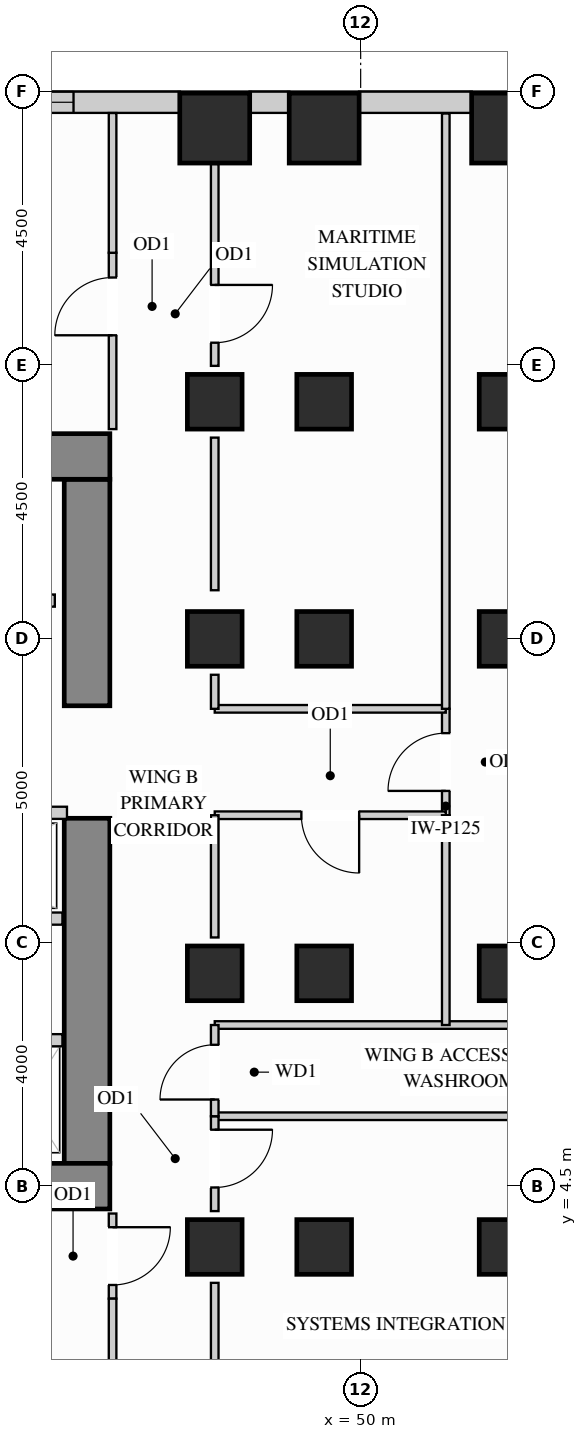
"""IFC4 building model, lengths in metres.
Left out: names, types, materials, properties, quantities, classifications, styles, units other than length and angle.
Written with IfcOpenShell. Run it as: python <this file> out.ifc"""

import sys

from ifc_helpers import new_model, si_unit, direction, frame, frame_2d, origin, origin_2d, place, context, subcontext, project, spatial, rectangle, extrude, source, transform, mapped, element, fill, save


model = new_model("IFC4")
c1 = context("Model", 3, precision=1e-05, world=origin(), true_north=direction((0.0, 1.0)))
c2 = subcontext(c1, "Body", "Model", "MODEL_VIEW")
j1 = project(units=[si_unit("LENGTHUNIT", "METRE"), si_unit("PLANEANGLEUNIT", "RADIAN")], contexts=[c1])
p1 = place(None, origin())
s1 = spatial("IfcSite", under=j1, at=p1, CompositionType="ELEMENT")
p2 = place(p1, origin())
s2 = spatial("IfcBuilding", under=s1, at=p2, CompositionType="ELEMENT")
p3 = place(p2, frame((0.0, 0.0, 77.4)))
s3 = spatial("IfcBuildingStorey", under=s2, at=p3, CompositionType="ELEMENT", Elevation=77.4)
m1 = source(origin(), c2, "Body", "SweptSolid", [
    extrude(rectangle(XDim=0.9, YDim=0.9, at=origin_2d()), origin(), (0.0, 0.0, 1.0), 3.38),
])
for number, where, z_axis, x_axis in (
    (1, (47.6, 13.5, 0.0), (0.0, 0.0, 1.0), (1.0, 0.0, 0.0)),
    (2, (47.6, 3.5, 0.0), (0.0, 0.0, 1.0), (1.0, 0.0, 0.0)),
    (3, (47.6, 8.0, 0.0), (0.0, 0.0, 1.0), (1.0, 0.0, 0.0)),
    (4, (47.6, 17.4, 0.0), (0.0, 0.0, 1.0), (1.0, 0.0, 0.0)),
    (5, (49.4, 13.5, 0.0), (0.0, 0.0, 1.0), (1.0, 0.0, 0.0)),
    (6, (49.4, 17.4, 0.0), (0.0, 0.0, 1.0), (1.0, 0.0, 0.0)),
    (7, (49.4, 3.5, 0.0), (0.0, 0.0, 1.0), (1.0, 0.0, 0.0)),
    (8, (49.4, 8.0, 0.0), (0.0, 0.0, 1.0), (1.0, 0.0, 0.0)),
    (9, (52.4, 13.5, 0.0), (0.0, 0.0, 1.0), (1.0, 0.0, 0.0)),
    (10, (52.4, 17.4, 0.0), (0.0, 0.0, 1.0), (1.0, 0.0, 0.0)),
    (11, (52.4, 3.5, 0.0), (0.0, 0.0, 1.0), (1.0, 0.0, 0.0)),
    (12, (52.4, 8.0, 0.0), (0.0, 0.0, 1.0), (1.0, 0.0, 0.0)),
):
    element("IfcColumn", number, at=place(p3, frame(where, z_axis=z_axis, x_axis=x_axis)), inside=s3, PredefinedType="COLUMN", context=c2, shape_type="MappedRepresentation", body=[
        mapped(m1, transform((0.0, 0.0, 0.0), x_axis=(1.0, 0.0, 0.0), y_axis=(0.0, 1.0, 0.0), z_axis=(0.0, 0.0, 1.0))),
    ])
m2 = source(origin(), c2, "Body", "SweptSolid", [
    extrude(rectangle(XDim=1.15, YDim=1.15, at=origin_2d()), origin(), (0.0, 0.0, 1.0), 3.38),
])
for number, where, z_axis, x_axis in (
    (13, (47.6, 21.9, 0.0), (0.0, 0.0, 1.0), (1.0, 0.0, 0.0)),
    (14, (49.4, 21.9, 0.0), (0.0, 0.0, 1.0), (1.0, 0.0, 0.0)),
    (15, (52.4, 21.9, 0.0), (0.0, 0.0, 1.0), (1.0, 0.0, 0.0)),
):
    element("IfcColumn", number, at=place(p3, frame(where, z_axis=z_axis, x_axis=x_axis)), inside=s3, PredefinedType="COLUMN", context=c2, shape_type="MappedRepresentation", body=[
        mapped(m2, transform((0.0, 0.0, 0.0), x_axis=(1.0, 0.0, 0.0), y_axis=(0.0, 1.0, 0.0), z_axis=(0.0, 0.0, 1.0))),
    ])
m3 = source(origin(), c2, "Body", "SweptSolid", [
    extrude(rectangle(XDim=5.675, YDim=0.75, at=frame_2d((2.837, 0.0))), origin(), (0.0, 0.0, 1.0), 3.38),
])
p4 = place(p3, frame((45.5, 4.875, 0.0), z_axis=(0.0, 0.0, 1.0), x_axis=(0.0, 1.0, 0.0)))
e16 = element("IfcWall", 16, at=p4, inside=s3, PredefinedType="SHEAR", context=c2, shape_type="MappedRepresentation", body=[
    mapped(m3, transform((0.0, 0.0, 0.0), x_axis=(1.0, 0.0, 0.0), y_axis=(0.0, 1.0, 0.0), z_axis=(0.0, 0.0, 1.0))),
])
m4 = source(origin(), c2, "Body", "SweptSolid", [
    extrude(rectangle(XDim=3.725, YDim=0.75, at=frame_2d((1.863, 0.0))), origin(), (0.0, 0.0, 1.0), 3.38),
])
p5 = place(p3, frame((45.5, 12.4, 0.0), z_axis=(0.0, 0.0, 1.0), x_axis=(0.0, 1.0, 0.0)))
e17 = element("IfcWall", 17, at=p5, inside=s3, PredefinedType="SHEAR", context=c2, shape_type="MappedRepresentation", body=[
    mapped(m4, transform((0.0, 0.0, 0.0), x_axis=(1.0, 0.0, 0.0), y_axis=(0.0, 1.0, 0.0), z_axis=(0.0, 0.0, 1.0))),
])
m5 = source(origin(), c2, "Body", "SweptSolid", [
    extrude(rectangle(XDim=10.25, YDim=0.75, at=frame_2d((5.125, 0.0))), origin(), (0.0, 0.0, 1.0), 3.38),
])
for number, where, z_axis, x_axis in (
    (18, (35.625, 16.5, 0.0), (0.0, 0.0, 1.0), (1.0, 0.0, 0.0)),
    (19, (35.625, 4.5, 0.0), (0.0, 0.0, 1.0), (1.0, 0.0, 0.0)),
):
    element("IfcWall", number, at=place(p3, frame(where, z_axis=z_axis, x_axis=x_axis)), inside=s3, PredefinedType="SHEAR", context=c2, shape_type="MappedRepresentation", body=[
        mapped(m5, transform((0.0, 0.0, 0.0), x_axis=(1.0, 0.0, 0.0), y_axis=(0.0, 1.0, 0.0), z_axis=(0.0, 0.0, 1.0))),
    ])
m6 = source(origin(), c2, "Body", "SweptSolid", [
    extrude(rectangle(XDim=1.854, YDim=0.35, at=frame_2d((0.927, 0.0))), origin(), (0.0, 0.0, 1.0), 3.365),
])
p6 = place(p3, frame((51.827, 22.325, 0.0), z_axis=(0.0, 0.0, 1.0), x_axis=(-1.0, 0.0, 0.0)))
e20 = element("IfcWall", 20, at=p6, inside=s3, PredefinedType="SOLIDWALL", context=c2, shape_type="MappedRepresentation", body=[
    mapped(m6, transform((0.0, 0.0, 0.0), x_axis=(1.0, 0.0, 0.0), y_axis=(0.0, 1.0, 0.0), z_axis=(0.0, 0.0, 1.0))),
])
m7 = source(origin(), c2, "Body", "SweptSolid", [
    extrude(rectangle(XDim=0.654, YDim=0.35, at=frame_2d((0.327, 0.0))), origin(), (0.0, 0.0, 1.0), 3.365),
])
p7 = place(p3, frame((48.827, 22.325, 0.0), z_axis=(0.0, 0.0, 1.0), x_axis=(-1.0, 0.0, 0.0)))
e21 = element("IfcWall", 21, at=p7, inside=s3, PredefinedType="SOLIDWALL", context=c2, shape_type="MappedRepresentation", body=[
    mapped(m7, transform((0.0, 0.0, 0.0), x_axis=(1.0, 0.0, 0.0), y_axis=(0.0, 1.0, 0.0), z_axis=(0.0, 0.0, 1.0))),
])
p8 = place(p3, frame((47.027, 22.325, 0.0), z_axis=(0.0, 0.0, 1.0), x_axis=(-1.0, 0.0, 0.0)))
e22 = element("IfcWall", 22, at=p8, inside=s3, PredefinedType="SOLIDWALL", context=c2, shape_type="SweptSolid", body=[
    extrude(rectangle(XDim=6.454, YDim=0.35, at=frame_2d((3.227, 0.0))), origin(), (0.0, 0.0, 1.0), 3.365),
])
p9 = place(p8, frame((1.749, 0.0, 0.78)))
e23 = element("IfcOpeningElement", 23, at=p9, cuts=e22, PredefinedType="OPENING", context=c2, shape_type="SweptSolid", body=[
    extrude(rectangle(XDim=1.8, YDim=2.1, at=frame_2d((0.9, 1.05))), frame((0.0, 0.185, 0.0), z_axis=(0.0, -1.0, 0.0), x_axis=(1.0, 0.0, 0.0)), (0.0, 0.0, 1.0), 0.37),
])
p10 = place(p8, frame((3.942, 0.0, 0.78)))
e24 = element("IfcOpeningElement", 24, at=p10, cuts=e22, PredefinedType="OPENING", context=c2, shape_type="SweptSolid", body=[
    extrude(rectangle(XDim=1.8, YDim=2.1, at=frame_2d((0.9, 1.05))), frame((0.0, 0.185, 0.0), z_axis=(0.0, -1.0, 0.0), x_axis=(1.0, 0.0, 0.0)), (0.0, 0.0, 1.0), 0.37),
])
p11 = place(p3, frame((51.4, 10.6, 0.0), z_axis=(0.0, 0.0, 1.0), x_axis=(0.0, 1.0, 0.0)))
e25 = element("IfcWall", 25, at=p11, inside=s3, PredefinedType="PARTITIONING", context=c2, shape_type="SweptSolid", body=[
    extrude(rectangle(XDim=1.75, YDim=0.125, at=frame_2d((0.875, 0.0))), origin(), (0.0, 0.0, 1.0), 3.365),
])
p12 = place(p11, frame((0.4, 0.0, 0.0)))
e26 = element("IfcOpeningElement", 26, at=p12, cuts=e25, PredefinedType="OPENING", context=c2, shape_type="SweptSolid", body=[
    extrude(rectangle(XDim=0.95, YDim=2.15, at=frame_2d((0.475, 1.075))), frame((0.0, 0.073, 0.0), z_axis=(0.0, -1.0, 0.0), x_axis=(1.0, 0.0, 0.0)), (0.0, 0.0, 1.0), 0.145),
])
m8 = source(origin(), c2, "Body", "SweptSolid", [
    extrude(rectangle(XDim=8.048, YDim=0.125, at=frame_2d((4.024, 0.0))), origin(), (0.0, 0.0, 1.0), 3.365),
])
for number, where, z_axis, x_axis in (
    (27, (47.6, 5.65, 0.0), (0.0, 0.0, 1.0), (1.0, 0.0, 0.0)),
    (28, (47.6, 7.15, 0.0), (0.0, 0.0, 1.0), (1.0, 0.0, 0.0)),
):
    element("IfcWall", number, at=place(p3, frame(where, z_axis=z_axis, x_axis=x_axis)), inside=s3, PredefinedType="PARTITIONING", context=c2, shape_type="MappedRepresentation", body=[
        mapped(m8, transform((0.0, 0.0, 0.0), x_axis=(1.0, 0.0, 0.0), y_axis=(0.0, 1.0, 0.0), z_axis=(0.0, 0.0, 1.0))),
    ])
m9 = source(origin(), c2, "Body", "SweptSolid", [
    extrude(rectangle(XDim=3.8, YDim=0.125, at=frame_2d((1.9, 0.0))), origin(), (0.0, 0.0, 1.0), 3.365),
])
p13 = place(p3, frame((47.6, 12.35, 0.0), z_axis=(0.0, 0.0, 1.0), x_axis=(1.0, 0.0, 0.0)))
e29 = element("IfcWall", 29, at=p13, inside=s3, PredefinedType="PARTITIONING", context=c2, shape_type="MappedRepresentation", body=[
    mapped(m9, transform((0.0, 0.0, 0.0), x_axis=(1.0, 0.0, 0.0), y_axis=(0.0, 1.0, 0.0), z_axis=(0.0, 0.0, 1.0))),
])
p14 = place(p3, frame((47.6, 10.6, 0.0), z_axis=(0.0, 0.0, 1.0), x_axis=(1.0, 0.0, 0.0)))
e30 = element("IfcWall", 30, at=p14, inside=s3, PredefinedType="PARTITIONING", context=c2, shape_type="SweptSolid", body=[
    extrude(rectangle(XDim=3.8, YDim=0.125, at=frame_2d((1.9, 0.0))), origin(), (0.0, 0.0, 1.0), 2.677),
])
p15 = place(p14, frame((1.425, 0.0, 0.0)))
e31 = element("IfcOpeningElement", 31, at=p15, cuts=e30, PredefinedType="OPENING", context=c2, shape_type="SweptSolid", body=[
    extrude(rectangle(XDim=0.95, YDim=2.15, at=frame_2d((0.475, 1.075))), frame((0.0, 0.073, 0.0), z_axis=(0.0, -1.0, 0.0), x_axis=(1.0, 0.0, 0.0)), (0.0, 0.0, 1.0), 0.145),
])
m10 = source(origin(), c2, "Body", "SweptSolid", [
    extrude(rectangle(XDim=3.45, YDim=0.125, at=frame_2d((1.725, 0.0))), origin(), (0.0, 0.0, 1.0), 3.365),
])
p16 = place(p3, frame((51.4, 7.15, 0.0), z_axis=(0.0, 0.0, 1.0), x_axis=(0.0, 1.0, 0.0)))
e32 = element("IfcWall", 32, at=p16, inside=s3, PredefinedType="PARTITIONING", context=c2, shape_type="MappedRepresentation", body=[
    mapped(m10, transform((0.0, 0.0, 0.0), x_axis=(1.0, 0.0, 0.0), y_axis=(0.0, 1.0, 0.0), z_axis=(0.0, 0.0, 1.0))),
])
m11 = source(origin(), c2, "Body", "SweptSolid", [
    extrude(rectangle(XDim=9.79, YDim=0.125, at=frame_2d((4.895, 0.0))), origin(), (0.0, 0.0, 1.0), 3.365),
])
p17 = place(p3, frame((51.4, 12.35, 0.0), z_axis=(0.0, 0.0, 1.0), x_axis=(0.0, 1.0, 0.0)))
e33 = element("IfcWall", 33, at=p17, inside=s3, PredefinedType="PARTITIONING", context=c2, shape_type="MappedRepresentation", body=[
    mapped(m11, transform((0.0, 0.0, 0.0), x_axis=(1.0, 0.0, 0.0), y_axis=(0.0, 1.0, 0.0), z_axis=(0.0, 0.0, 1.0))),
])
p18 = place(p3, frame((47.6, 4.09, 0.0), z_axis=(0.0, 0.0, 1.0), x_axis=(0.0, 1.0, 0.0)))
e34 = element("IfcWall", 34, at=p18, inside=s3, PredefinedType="PARTITIONING", context=c2, shape_type="SweptSolid", body=[
    extrude(rectangle(XDim=1.56, YDim=0.125, at=frame_2d((0.78, 0.0))), origin(), (0.0, 0.0, 1.0), 2.677),
])
p19 = place(p18, frame((0.388, 0.0, 0.0)))
e35 = element("IfcOpeningElement", 35, at=p19, cuts=e34, PredefinedType="OPENING", context=c2, shape_type="SweptSolid", body=[
    extrude(rectangle(XDim=0.95, YDim=2.15, at=frame_2d((0.475, 1.075))), frame((0.0, 0.073, 0.0), z_axis=(0.0, -1.0, 0.0), x_axis=(1.0, 0.0, 0.0)), (0.0, 0.0, 1.0), 0.145),
])
m12 = source(origin(), c2, "Body", "SweptSolid", [
    extrude(rectangle(XDim=1.72, YDim=0.125, at=frame_2d((0.86, 0.0))), origin(), (0.0, 0.0, 1.0), 2.677),
])
p20 = place(p3, frame((47.6, 1.19, 0.0), z_axis=(0.0, 0.0, 1.0), x_axis=(0.0, 1.0, 0.0)))
e36 = element("IfcWall", 36, at=p20, inside=s3, PredefinedType="PARTITIONING", context=c2, shape_type="MappedRepresentation", body=[
    mapped(m12, transform((0.0, 0.0, 0.0), x_axis=(1.0, 0.0, 0.0), y_axis=(0.0, 1.0, 0.0), z_axis=(0.0, 0.0, 1.0))),
])
m13 = source(origin(), c2, "Body", "SweptSolid", [
    extrude(rectangle(XDim=2.01, YDim=0.125, at=frame_2d((1.005, 0.0))), origin(), (0.0, 0.0, 1.0), 2.677),
])
p21 = place(p3, frame((47.6, 8.59, 0.0), z_axis=(0.0, 0.0, 1.0), x_axis=(0.0, 1.0, 0.0)))
e37 = element("IfcWall", 37, at=p21, inside=s3, PredefinedType="PARTITIONING", context=c2, shape_type="MappedRepresentation", body=[
    mapped(m13, transform((0.0, 0.0, 0.0), x_axis=(1.0, 0.0, 0.0), y_axis=(0.0, 1.0, 0.0), z_axis=(0.0, 0.0, 1.0))),
])
m14 = source(origin(), c2, "Body", "SweptSolid", [
    extrude(rectangle(XDim=2.51, YDim=0.125, at=frame_2d((1.255, 0.0))), origin(), (0.0, 0.0, 1.0), 2.677),
])
p22 = place(p3, frame((47.6, 14.3, 0.0), z_axis=(0.0, 0.0, 1.0), x_axis=(0.0, 1.0, 0.0)))
e38 = element("IfcWall", 38, at=p22, inside=s3, PredefinedType="PARTITIONING", context=c2, shape_type="MappedRepresentation", body=[
    mapped(m14, transform((0.0, 0.0, 0.0), x_axis=(1.0, 0.0, 0.0), y_axis=(0.0, 1.0, 0.0), z_axis=(0.0, 0.0, 1.0))),
])
p23 = place(p3, frame((47.6, 17.99, 0.0), z_axis=(0.0, 0.0, 1.0), x_axis=(0.0, 1.0, 0.0)))
e39 = element("IfcWall", 39, at=p23, inside=s3, PredefinedType="PARTITIONING", context=c2, shape_type="SweptSolid", body=[
    extrude(rectangle(XDim=3.32, YDim=0.125, at=frame_2d((1.66, 0.0))), origin(), (0.0, 0.0, 1.0), 2.677),
])
p24 = place(p23, frame((0.381, 0.0, 0.0)))
e40 = element("IfcOpeningElement", 40, at=p24, cuts=e39, PredefinedType="OPENING", context=c2, shape_type="SweptSolid", body=[
    extrude(rectangle(XDim=0.95, YDim=2.15, at=frame_2d((0.475, 1.075))), frame((0.0, 0.073, 0.0), z_axis=(0.0, -1.0, 0.0), x_axis=(1.0, 0.0, 0.0)), (0.0, 0.0, 1.0), 0.145),
])
m15 = source(origin(), c2, "Body", "SweptSolid", [
    extrude(rectangle(XDim=0.56, YDim=0.125, at=frame_2d((0.28, 0.0))), origin(), (0.0, 0.0, 1.0), 2.677),
])
p25 = place(p3, frame((47.6, 12.35, 0.0), z_axis=(0.0, 0.0, 1.0), x_axis=(0.0, 1.0, 0.0)))
e41 = element("IfcWall", 41, at=p25, inside=s3, PredefinedType="PARTITIONING", context=c2, shape_type="MappedRepresentation", body=[
    mapped(m15, transform((0.0, 0.0, 0.0), x_axis=(1.0, 0.0, 0.0), y_axis=(0.0, 1.0, 0.0), z_axis=(0.0, 0.0, 1.0))),
])
p26 = place(p3, frame((47.6, 5.65, 0.0), z_axis=(0.0, 0.0, 1.0), x_axis=(0.0, 1.0, 0.0)))
e42 = element("IfcWall", 42, at=p26, inside=s3, PredefinedType="PARTITIONING", context=c2, shape_type="SweptSolid", body=[
    extrude(rectangle(XDim=1.5, YDim=0.125, at=frame_2d((0.75, 0.0))), origin(), (0.0, 0.0, 1.0), 2.677),
])
p27 = place(p26, frame((0.275, 0.0, 0.0)))
e43 = element("IfcOpeningElement", 43, at=p27, cuts=e42, PredefinedType="OPENING", context=c2, shape_type="SweptSolid", body=[
    extrude(rectangle(XDim=0.9, YDim=2.15, at=frame_2d((0.45, 1.075))), frame((0.0, 0.073, 0.0), z_axis=(0.0, -1.0, 0.0), x_axis=(1.0, 0.0, 0.0)), (0.0, 0.0, 1.0), 0.145),
])
p28 = place(p3, frame((45.92, 16.95, 0.0), z_axis=(0.0, 0.0, 1.0), x_axis=(0.0, 1.0, 0.0)))
e44 = element("IfcWall", 44, at=p28, inside=s3, PredefinedType="PARTITIONING", context=c2, shape_type="SweptSolid", body=[
    extrude(rectangle(XDim=2.9, YDim=0.125, at=frame_2d((1.45, 0.0))), origin(), (0.0, 0.0, 1.0), 3.365),
])
p29 = place(p28, frame((1.543, 0.0, 0.0)))
e45 = element("IfcOpeningElement", 45, at=p29, cuts=e44, PredefinedType="OPENING", context=c2, shape_type="SweptSolid", body=[
    extrude(rectangle(XDim=0.95, YDim=2.15, at=frame_2d((0.475, 1.075))), frame((0.0, 0.073, 0.0), z_axis=(0.0, -1.0, 0.0), x_axis=(1.0, 0.0, 0.0)), (0.0, 0.0, 1.0), 0.145),
])
m16 = source(origin(), c2, "Body", "SweptSolid", [
    extrude(rectangle(XDim=2.298, YDim=0.125, at=frame_2d((1.149, 0.0))), origin(), (0.0, 0.0, 1.0), 3.365),
])
p30 = place(p3, frame((45.92, 19.85, 0.0), z_axis=(0.0, 0.0, 1.0), x_axis=(0.0, 1.0, 0.0)))
e46 = element("IfcWall", 46, at=p30, inside=s3, PredefinedType="PARTITIONING", context=c2, shape_type="MappedRepresentation", body=[
    mapped(m16, transform((0.0, 0.0, 0.0), x_axis=(1.0, 0.0, 0.0), y_axis=(0.0, 1.0, 0.0), z_axis=(0.0, 0.0, 1.0))),
])
p31 = place(p3, frame((45.92, 2.65, 0.0), z_axis=(0.0, 0.0, 1.0), x_axis=(0.0, 1.0, 0.0)))
e47 = element("IfcWall", 47, at=p31, inside=s3, PredefinedType="PARTITIONING", context=c2, shape_type="SweptSolid", body=[
    extrude(rectangle(XDim=1.4, YDim=0.125, at=frame_2d((0.7, 0.0))), origin(), (0.0, 0.0, 1.0), 3.365),
])
p32 = place(p31, frame((0.225, 0.0, 0.0)))
e48 = element("IfcOpeningElement", 48, at=p32, cuts=e47, PredefinedType="OPENING", context=c2, shape_type="SweptSolid", body=[
    extrude(rectangle(XDim=0.95, YDim=2.15, at=frame_2d((0.475, 1.075))), frame((0.0, 0.073, 0.0), z_axis=(0.0, -1.0, 0.0), x_axis=(1.0, 0.0, 0.0)), (0.0, 0.0, 1.0), 0.145),
])
p33 = place(p3, frame((45.92, 0.352, 0.0), z_axis=(0.0, 0.0, 1.0), x_axis=(0.0, 1.0, 0.0)))
e49 = element("IfcWall", 49, at=p33, inside=s3, PredefinedType="PARTITIONING", context=c2, shape_type="MappedRepresentation", body=[
    mapped(m16, transform((0.0, 0.0, 0.0), x_axis=(1.0, 0.0, 0.0), y_axis=(0.0, 1.0, 0.0), z_axis=(0.0, 0.0, 1.0))),
])
m17 = source(origin(), c2, "Body", "SweptSolid", [
    extrude(rectangle(XDim=1.245, YDim=0.2, at=frame_2d((0.623, 0.0))), origin(), (0.0, 0.0, 1.0), 3.365),
])
p34 = place(p3, frame((43.85, 6.9, 0.0), z_axis=(0.0, 0.0, 1.0), x_axis=(1.0, 0.0, 0.0)))
e50 = element("IfcWall", 50, at=p34, inside=s3, PredefinedType="PARTITIONING", context=c2, shape_type="MappedRepresentation", body=[
    mapped(m17, transform((0.0, 0.0, 0.0), x_axis=(1.0, 0.0, 0.0), y_axis=(0.0, 1.0, 0.0), z_axis=(0.0, 0.0, 1.0))),
])
p35 = place(p3, frame((42.23, 14.13, 0.0), z_axis=(0.0, 0.0, 1.0), x_axis=(1.0, 0.0, 0.0)))
e51 = element("IfcWall", 51, at=p35, inside=s3, PredefinedType="PARTITIONING", context=c2, shape_type="SweptSolid", body=[
    extrude(rectangle(XDim=2.74, YDim=0.2, at=frame_2d((1.37, 0.0))), origin(), (0.0, 0.0, 1.0), 3.365),
])
p36 = place(p35, frame((0.82, 0.0, 0.0)))
e52 = element("IfcOpeningElement", 52, at=p36, cuts=e51, PredefinedType="OPENING", context=c2, shape_type="SweptSolid", body=[
    extrude(rectangle(XDim=1.1, YDim=2.2, at=frame_2d((0.55, 1.1))), frame((0.0, 0.11, 0.0), z_axis=(0.0, -1.0, 0.0), x_axis=(1.0, 0.0, 0.0)), (0.0, 0.0, 1.0), 0.22),
])
m18 = source(origin(), c2, "Body", "SweptSolid", [
    extrude(rectangle(XDim=3.49, YDim=0.2, at=frame_2d((1.745, 0.0))), origin(), (0.0, 0.0, 1.0), 3.365),
])
p37 = place(p3, frame((41.68, 10.64, 0.0), z_axis=(0.0, 0.0, 1.0), x_axis=(1.0, 0.0, 0.0)))
e53 = element("IfcWall", 53, at=p37, inside=s3, PredefinedType="PARTITIONING", context=c2, shape_type="MappedRepresentation", body=[
    mapped(m18, transform((0.0, 0.0, 0.0), x_axis=(1.0, 0.0, 0.0), y_axis=(0.0, 1.0, 0.0), z_axis=(0.0, 0.0, 1.0))),
])
m19 = source(origin(), c2, "Body", "SweptSolid", [
    extrude(rectangle(XDim=3.415, YDim=0.2, at=frame_2d((1.708, 0.0))), origin(), (0.0, 0.0, 1.0), 3.365),
])
p38 = place(p3, frame((41.68, 8.9, 0.0), z_axis=(0.0, 0.0, 1.0), x_axis=(1.0, 0.0, 0.0)))
e54 = element("IfcWall", 54, at=p38, inside=s3, PredefinedType="PARTITIONING", context=c2, shape_type="MappedRepresentation", body=[
    mapped(m19, transform((0.0, 0.0, 0.0), x_axis=(1.0, 0.0, 0.0), y_axis=(0.0, 1.0, 0.0), z_axis=(0.0, 0.0, 1.0))),
])
m20 = source(origin(), c2, "Body", "SweptSolid", [
    extrude(rectangle(XDim=0.95, YDim=2.15, at=frame_2d((0.475, 1.075))), frame((0.0, 0.025, 0.0), z_axis=(0.0, -1.0, 0.0), x_axis=(1.0, 0.0, 0.0)), (0.0, 0.0, 1.0), 0.05),
])
p39 = place(p29, origin())
e55 = element("IfcDoor", 55, at=p39, inside=s3, OperationType="SINGLE_SWING_LEFT", PredefinedType="DOOR", context=c2, shape_type="MappedRepresentation", body=[
    mapped(m20, transform((0.0, 0.0, 0.0), x_axis=(1.0, 0.0, 0.0), y_axis=(0.0, 1.0, 0.0), z_axis=(0.0, 0.0, 1.0))),
])
fill(e45, e55)
p40 = place(p32, origin())
e56 = element("IfcDoor", 56, at=p40, inside=s3, OperationType="SINGLE_SWING_RIGHT", PredefinedType="DOOR", context=c2, shape_type="MappedRepresentation", body=[
    mapped(m20, transform((0.0, 0.0, 0.0), x_axis=(1.0, 0.0, 0.0), y_axis=(0.0, 1.0, 0.0), z_axis=(0.0, 0.0, 1.0))),
])
fill(e48, e56)
p41 = place(p19, origin())
e57 = element("IfcDoor", 57, at=p41, inside=s3, OperationType="SINGLE_SWING_RIGHT", PredefinedType="DOOR", context=c2, shape_type="MappedRepresentation", body=[
    mapped(m20, transform((0.0, 0.0, 0.0), x_axis=(1.0, 0.0, 0.0), y_axis=(0.0, 1.0, 0.0), z_axis=(0.0, 0.0, 1.0))),
])
fill(e35, e57)
p42 = place(p15, origin())
e58 = element("IfcDoor", 58, at=p42, inside=s3, OperationType="SINGLE_SWING_RIGHT", PredefinedType="DOOR", context=c2, shape_type="MappedRepresentation", body=[
    mapped(m20, transform((0.0, 0.0, 0.0), x_axis=(1.0, 0.0, 0.0), y_axis=(0.0, 1.0, 0.0), z_axis=(0.0, 0.0, 1.0))),
])
fill(e31, e58)
p43 = place(p12, origin())
e59 = element("IfcDoor", 59, at=p43, inside=s3, OperationType="SINGLE_SWING_LEFT", PredefinedType="DOOR", context=c2, shape_type="MappedRepresentation", body=[
    mapped(m20, transform((0.0, 0.0, 0.0), x_axis=(1.0, 0.0, 0.0), y_axis=(0.0, 1.0, 0.0), z_axis=(0.0, 0.0, 1.0))),
])
fill(e26, e59)
p44 = place(p24, origin())
e60 = element("IfcDoor", 60, at=p44, inside=s3, OperationType="SINGLE_SWING_RIGHT", PredefinedType="DOOR", context=c2, shape_type="MappedRepresentation", body=[
    mapped(m20, transform((0.0, 0.0, 0.0), x_axis=(1.0, 0.0, 0.0), y_axis=(0.0, 1.0, 0.0), z_axis=(0.0, 0.0, 1.0))),
])
fill(e40, e60)
m21 = source(origin(), c2, "Body", "SweptSolid", [
    extrude(rectangle(XDim=0.9, YDim=2.15, at=frame_2d((0.45, 1.075))), frame((0.0, 0.025, 0.0), z_axis=(0.0, -1.0, 0.0), x_axis=(1.0, 0.0, 0.0)), (0.0, 0.0, 1.0), 0.05),
])
p45 = place(p27, origin())
e61 = element("IfcDoor", 61, at=p45, inside=s3, OperationType="SINGLE_SWING_LEFT", PredefinedType="DOOR", context=c2, shape_type="MappedRepresentation", body=[
    mapped(m21, transform((0.0, 0.0, 0.0), x_axis=(1.0, 0.0, 0.0), y_axis=(0.0, 1.0, 0.0), z_axis=(0.0, 0.0, 1.0))),
])
fill(e43, e61)
m22 = source(origin(), c2, "Body", "SweptSolid", [
    extrude(rectangle(XDim=1.8, YDim=2.1, at=frame_2d((0.9, 1.05))), frame((0.0, 0.03, 0.0), z_axis=(0.0, -1.0, 0.0), x_axis=(1.0, 0.0, 0.0)), (0.0, 0.0, 1.0), 0.06),
])
p46 = place(p9, origin())
e62 = element("IfcWindow", 62, at=p46, inside=s3, PartitioningType="SINGLE_PANEL", PredefinedType="WINDOW", context=c2, shape_type="MappedRepresentation", body=[
    mapped(m22, transform((0.0, 0.0, 0.0), x_axis=(1.0, 0.0, 0.0), y_axis=(0.0, 1.0, 0.0), z_axis=(0.0, 0.0, 1.0))),
])
fill(e23, e62)
save(model, sys.argv[1])
